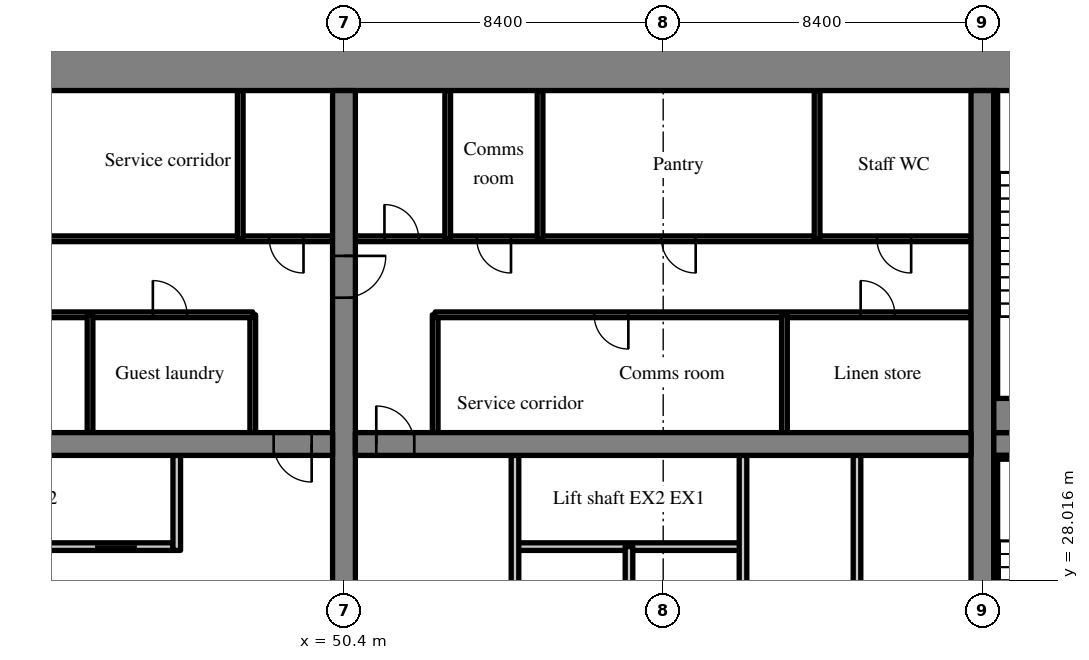
"""IFC4 building model, lengths in metres.
Left out: names, types, materials, properties, quantities, classifications, styles, units other than length and angle.
Written with IfcOpenShell. Run it as: python <this file> out.ifc"""

import sys

from ifc_helpers import new_model, si_unit, direction, frame, frame_2d, origin, place, context, subcontext, project, spatial, rectangle, extrude, source, transform, mapped, element, fill, save


model = new_model("IFC4")
c1 = context("Model", 3, precision=1e-05, world=origin(), true_north=direction((0.0, 1.0)))
c2 = subcontext(c1, "Body", "Model", "MODEL_VIEW")
j1 = project(units=[si_unit("LENGTHUNIT", "METRE"), si_unit("PLANEANGLEUNIT", "RADIAN")], contexts=[c1])
p1 = place(None, origin())
s1 = spatial("IfcSite", under=j1, at=p1, CompositionType="ELEMENT")
p2 = place(p1, origin())
s2 = spatial("IfcBuilding", under=s1, at=p2, CompositionType="ELEMENT")
p3 = place(p2, frame((0.0, 0.0, 39.2)))
s3 = spatial("IfcBuildingStorey", under=s2, at=p3, CompositionType="ELEMENT", Elevation=39.2)
m1 = source(origin(), c2, "Body", "SweptSolid", [
    extrude(rectangle(XDim=50.4, YDim=1.1, at=frame_2d((25.2, 0.0))), origin(), (0.0, 0.0, 1.0), 3.52),
])
p4 = place(p3, frame((25.2, 41.45, 0.0), z_axis=(0.0, 0.0, 1.0), x_axis=(1.0, 0.0, 0.0)))
e1 = element("IfcWall", 1, at=p4, inside=s3, PredefinedType="SHEAR", context=c2, shape_type="MappedRepresentation", body=[
    mapped(m1, transform((0.0, 0.0, 0.0), scale=1.0)),
])
m2 = source(origin(), c2, "Body", "SweptSolid", [
    extrude(rectangle(XDim=17.8, YDim=0.6, at=frame_2d((8.9, 0.0))), origin(), (0.0, 0.0, 1.0), 3.52),
])
p5 = place(p3, frame((50.4, 23.1, 0.0), z_axis=(0.0, 0.0, 1.0), x_axis=(0.0, 1.0, 0.0)))
e2 = element("IfcWall", 2, at=p5, inside=s3, PredefinedType="SHEAR", context=c2, shape_type="MappedRepresentation", body=[
    mapped(m2, transform((0.0, 0.0, 0.0), scale=1.0)),
])
m3 = source(origin(), c2, "Body", "SweptSolid", [
    extrude(rectangle(XDim=1.1, YDim=2.1, at=frame_2d((0.55, 1.05))), frame((0.0, 0.31, 0.0), z_axis=(0.0, -1.0, 0.0), x_axis=(1.0, 0.0, 0.0)), (0.0, 0.0, 1.0), 0.62),
])
p6 = place(p5, frame((12.35, 0.0, 0.0)))
e3 = element("IfcOpeningElement", 3, at=p6, cuts=e2, PredefinedType="OPENING", context=c2, shape_type="MappedRepresentation", body=[
    mapped(m3, transform((0.0, 0.0, 0.0), scale=1.0)),
])
p7 = place(p3, frame((67.2, 23.1, 0.0), z_axis=(0.0, 0.0, 1.0), x_axis=(0.0, 1.0, 0.0)))
e4 = element("IfcWall", 4, at=p7, inside=s3, PredefinedType="SHEAR", context=c2, shape_type="MappedRepresentation", body=[
    mapped(m2, transform((0.0, 0.0, 0.0), scale=1.0)),
])
m4 = source(origin(), c2, "Body", "SweptSolid", [
    extrude(rectangle(XDim=16.2, YDim=0.6, at=frame_2d((8.1, 0.0))), origin(), (0.0, 0.0, 1.0), 3.52),
])
p8 = place(p3, frame((33.9, 31.6, 0.0), z_axis=(0.0, 0.0, 1.0), x_axis=(1.0, 0.0, 0.0)))
e5 = element("IfcWall", 5, at=p8, inside=s3, PredefinedType="SHEAR", context=c2, shape_type="MappedRepresentation", body=[
    mapped(m4, transform((0.0, 0.0, 0.0), scale=1.0)),
])
m5 = source(origin(), c2, "Body", "SweptSolid", [
    extrude(rectangle(XDim=1.0, YDim=2.1, at=frame_2d((0.5, 1.05))), frame((0.0, 0.31, 0.0), z_axis=(0.0, -1.0, 0.0), x_axis=(1.0, 0.0, 0.0)), (0.0, 0.0, 1.0), 0.62),
])
p9 = place(p8, frame((14.65, 0.0, 0.0)))
e6 = element("IfcOpeningElement", 6, at=p9, cuts=e5, PredefinedType="OPENING", context=c2, shape_type="MappedRepresentation", body=[
    mapped(m5, transform((0.0, 0.0, 0.0), scale=1.0)),
])
m6 = source(origin(), c2, "Body", "SweptSolid", [
    extrude(rectangle(XDim=16.2, YDim=0.6, at=frame_2d((8.1, 0.0))), origin(), (0.0, 0.0, 1.0), 3.52),
])
p10 = place(p3, frame((50.7, 31.6, 0.0), z_axis=(0.0, 0.0, 1.0), x_axis=(1.0, 0.0, 0.0)))
e7 = element("IfcWall", 7, at=p10, inside=s3, PredefinedType="SHEAR", context=c2, shape_type="MappedRepresentation", body=[
    mapped(m6, transform((0.0, 0.0, 0.0), scale=1.0)),
])
p11 = place(p10, frame((0.55, 0.0, 0.0)))
e8 = element("IfcOpeningElement", 8, at=p11, cuts=e7, PredefinedType="OPENING", context=c2, shape_type="MappedRepresentation", body=[
    mapped(m5, transform((0.0, 0.0, 0.0), scale=1.0)),
])
m7 = source(origin(), c2, "Body", "SweptSolid", [
    extrude(rectangle(XDim=7.0, YDim=0.6, at=frame_2d((3.5, 0.0))), origin(), (0.0, 0.0, 1.0), 3.52),
])
p12 = place(p3, frame((67.5, 31.6, 0.0), z_axis=(0.0, 0.0, 1.0), x_axis=(1.0, 0.0, 0.0)))
e9 = element("IfcWall", 9, at=p12, inside=s3, PredefinedType="SHEAR", context=c2, shape_type="MappedRepresentation", body=[
    mapped(m7, transform((0.0, 0.0, 0.0), scale=1.0)),
])
p13 = place(p12, frame((5.425, 0.0, 0.0)))
e10 = element("IfcOpeningElement", 10, at=p13, cuts=e9, PredefinedType="OPENING", context=c2, shape_type="MappedRepresentation", body=[
    mapped(m3, transform((0.0, 0.0, 0.0), scale=1.0)),
])
m8 = source(origin(), c2, "Body", "SweptSolid", [
    extrude(rectangle(XDim=12.0, YDim=0.2, at=frame_2d((6.0, 0.0))), origin(), (0.0, 0.0, 1.0), 3.52),
])
p14 = place(p3, frame((33.9, 28.9, 0.0), z_axis=(0.0, 0.0, 1.0), x_axis=(1.0, 0.0, 0.0)))
e11 = element("IfcWall", 11, at=p14, inside=s3, PredefinedType="SOLIDWALL", context=c2, shape_type="MappedRepresentation", body=[
    mapped(m8, transform((0.0, 0.0, 0.0), scale=1.0)),
])
m9 = source(origin(), c2, "Body", "SweptSolid", [
    extrude(rectangle(XDim=1.1, YDim=2.1, at=frame_2d((0.55, 1.05))), frame((0.0, 0.11, 0.0), z_axis=(0.0, -1.0, 0.0), x_axis=(1.0, 0.0, 0.0)), (0.0, 0.0, 1.0), 0.22),
])
p15 = place(p14, frame((0.95, 0.0, 0.0)))
e12 = element("IfcOpeningElement", 12, at=p15, cuts=e11, PredefinedType="OPENING", context=c2, shape_type="MappedRepresentation", body=[
    mapped(m9, transform((0.0, 0.0, 0.0), scale=1.0)),
])
p16 = place(p14, frame((3.95, 0.0, 0.0)))
e13 = element("IfcOpeningElement", 13, at=p16, cuts=e11, PredefinedType="OPENING", context=c2, shape_type="MappedRepresentation", body=[
    mapped(m9, transform((0.0, 0.0, 0.0), scale=1.0)),
])
p17 = place(p14, frame((6.95, 0.0, 0.0)))
e14 = element("IfcOpeningElement", 14, at=p17, cuts=e11, PredefinedType="OPENING", context=c2, shape_type="MappedRepresentation", body=[
    mapped(m9, transform((0.0, 0.0, 0.0), scale=1.0)),
])
p18 = place(p14, frame((9.95, 0.0, 0.0)))
e15 = element("IfcOpeningElement", 15, at=p18, cuts=e11, PredefinedType="OPENING", context=c2, shape_type="MappedRepresentation", body=[
    mapped(m9, transform((0.0, 0.0, 0.0), scale=1.0)),
])
m10 = source(origin(), c2, "Body", "SweptSolid", [
    extrude(rectangle(XDim=2.5, YDim=0.2, at=frame_2d((1.25, 0.0))), origin(), (0.0, 0.0, 1.0), 3.52),
])
p19 = place(p3, frame((46.0, 28.8, 0.0), z_axis=(0.0, 0.0, 1.0), x_axis=(0.0, 1.0, 0.0)))
e16 = element("IfcWall", 16, at=p19, inside=s3, PredefinedType="SOLIDWALL", context=c2, shape_type="MappedRepresentation", body=[
    mapped(m10, transform((0.0, 0.0, 0.0), scale=1.0)),
])
m11 = source(origin(), c2, "Body", "SweptSolid", [
    extrude(rectangle(XDim=3.1, YDim=0.15, at=frame_2d((1.55, 0.0))), origin(), (0.0, 0.0, 1.0), 3.52),
])
p20 = place(p3, frame((48.0, 31.9, 0.0), z_axis=(0.0, 0.0, 1.0), x_axis=(0.0, 1.0, 0.0)))
e17 = element("IfcWall", 17, at=p20, inside=s3, PredefinedType="PARTITIONING", context=c2, shape_type="MappedRepresentation", body=[
    mapped(m11, transform((0.0, 0.0, 0.0), scale=1.0)),
])
m12 = source(origin(), c2, "Body", "SweptSolid", [
    extrude(rectangle(XDim=14.1, YDim=0.15, at=frame_2d((7.05, 0.0))), origin(), (0.0, 0.0, 1.0), 3.52),
])
p21 = place(p3, frame((33.9, 35.0, 0.0), z_axis=(0.0, 0.0, 1.0), x_axis=(1.0, 0.0, 0.0)))
e18 = element("IfcWall", 18, at=p21, inside=s3, PredefinedType="PARTITIONING", context=c2, shape_type="MappedRepresentation", body=[
    mapped(m12, transform((0.0, 0.0, 0.0), scale=1.0)),
])
m13 = source(origin(), c2, "Body", "SweptSolid", [
    extrude(rectangle(XDim=0.9, YDim=2.1, at=frame_2d((0.45, 1.05))), frame((0.0, 0.085, 0.0), z_axis=(0.0, -1.0, 0.0), x_axis=(1.0, 0.0, 0.0)), (0.0, 0.0, 1.0), 0.17),
])
p22 = place(p21, frame((0.952, 0.0, 0.0)))
e19 = element("IfcOpeningElement", 19, at=p22, cuts=e18, PredefinedType="OPENING", context=c2, shape_type="MappedRepresentation", body=[
    mapped(m13, transform((0.0, 0.0, 0.0), scale=1.0)),
])
p23 = place(p21, frame((5.861, 0.0, 0.0)))
e20 = element("IfcOpeningElement", 20, at=p23, cuts=e18, PredefinedType="OPENING", context=c2, shape_type="MappedRepresentation", body=[
    mapped(m13, transform((0.0, 0.0, 0.0), scale=1.0)),
])
p24 = place(p21, frame((11.471, 0.0, 0.0)))
e21 = element("IfcOpeningElement", 21, at=p24, cuts=e18, PredefinedType="OPENING", context=c2, shape_type="MappedRepresentation", body=[
    mapped(m13, transform((0.0, 0.0, 0.0), scale=1.0)),
])
m14 = source(origin(), c2, "Body", "SweptSolid", [
    extrude(rectangle(XDim=16.2, YDim=0.15, at=frame_2d((8.1, 0.0))), origin(), (0.0, 0.0, 1.0), 3.52),
])
p25 = place(p3, frame((33.9, 37.0, 0.0), z_axis=(0.0, 0.0, 1.0), x_axis=(1.0, 0.0, 0.0)))
e22 = element("IfcWall", 22, at=p25, inside=s3, PredefinedType="PARTITIONING", context=c2, shape_type="MappedRepresentation", body=[
    mapped(m14, transform((0.0, 0.0, 0.0), scale=1.0)),
])
p26 = place(p25, frame((6.435, 0.0, 0.0)))
e23 = element("IfcOpeningElement", 23, at=p26, cuts=e22, PredefinedType="OPENING", context=c2, shape_type="MappedRepresentation", body=[
    mapped(m13, transform((0.0, 0.0, 0.0), scale=1.0)),
])
p27 = place(p25, frame((14.535, 0.0, 0.0)))
e24 = element("IfcOpeningElement", 24, at=p27, cuts=e22, PredefinedType="OPENING", context=c2, shape_type="MappedRepresentation", body=[
    mapped(m13, transform((0.0, 0.0, 0.0), scale=1.0)),
])
p28 = place(p3, frame((43.718, 31.9, 0.0), z_axis=(0.0, 0.0, 1.0), x_axis=(0.0, 1.0, 0.0)))
e25 = element("IfcWall", 25, at=p28, inside=s3, PredefinedType="PARTITIONING", context=c2, shape_type="MappedRepresentation", body=[
    mapped(m11, transform((0.0, 0.0, 0.0), scale=1.0)),
])
m15 = source(origin(), c2, "Body", "SweptSolid", [
    extrude(rectangle(XDim=3.9, YDim=0.15, at=frame_2d((1.95, 0.0))), origin(), (0.0, 0.0, 1.0), 3.52),
])
p29 = place(p3, frame((47.67, 37.0, 0.0), z_axis=(0.0, 0.0, 1.0), x_axis=(0.0, 1.0, 0.0)))
e26 = element("IfcWall", 26, at=p29, inside=s3, PredefinedType="PARTITIONING", context=c2, shape_type="MappedRepresentation", body=[
    mapped(m15, transform((0.0, 0.0, 0.0), scale=1.0)),
])
m16 = source(origin(), c2, "Body", "SweptSolid", [
    extrude(rectangle(XDim=6.0, YDim=0.2, at=frame_2d((3.0, 0.0))), origin(), (0.0, 0.0, 1.0), 3.52),
])
p30 = place(p3, frame((60.9, 28.9, 0.0), z_axis=(0.0, 0.0, 1.0), x_axis=(-1.0, 0.0, 0.0)))
e27 = element("IfcWall", 27, at=p30, inside=s3, PredefinedType="SOLIDWALL", context=c2, shape_type="MappedRepresentation", body=[
    mapped(m16, transform((0.0, 0.0, 0.0), scale=1.0)),
])
m17 = source(origin(), c2, "Body", "SweptSolid", [
    extrude(rectangle(XDim=8.2, YDim=0.2, at=frame_2d((4.1, 0.0))), origin(), (0.0, 0.0, 1.0), 3.52),
])
for number, where, z_axis, x_axis in (
    (28, (54.9, 23.1, 0.0), (0.0, 0.0, 1.0), (0.0, 1.0, 0.0)),
    (29, (60.9, 23.1, 0.0), (0.0, 0.0, 1.0), (0.0, 1.0, 0.0)),
):
    element("IfcWall", number, at=place(p3, frame(where, z_axis=z_axis, x_axis=x_axis)), inside=s3, PredefinedType="PARTITIONING", context=c2, shape_type="MappedRepresentation", body=[
        mapped(m17, transform((0.0, 0.0, 0.0), scale=1.0)),
    ])
m18 = source(origin(), c2, "Body", "SweptSolid", [
    extrude(rectangle(XDim=5.8, YDim=0.2, at=frame_2d((2.9, 0.0))), origin(), (0.0, 0.0, 1.0), 3.52),
])
p31 = place(p3, frame((57.9, 23.1, 0.0), z_axis=(0.0, 0.0, 1.0), x_axis=(0.0, 1.0, 0.0)))
e30 = element("IfcWall", 30, at=p31, inside=s3, PredefinedType="PARTITIONING", context=c2, shape_type="MappedRepresentation", body=[
    mapped(m18, transform((0.0, 0.0, 0.0), scale=1.0)),
])
p32 = place(p3, frame((63.9, 23.1, 0.0), z_axis=(0.0, 0.0, 1.0), x_axis=(0.0, 1.0, 0.0)))
e31 = element("IfcWall", 31, at=p32, inside=s3, PredefinedType="PARTITIONING", context=c2, shape_type="MappedRepresentation", body=[
    mapped(m17, transform((0.0, 0.0, 0.0), scale=1.0)),
])
p33 = place(p3, frame((52.8, 31.9, 0.0), z_axis=(0.0, 0.0, 1.0), x_axis=(0.0, 1.0, 0.0)))
e32 = element("IfcWall", 32, at=p33, inside=s3, PredefinedType="PARTITIONING", context=c2, shape_type="MappedRepresentation", body=[
    mapped(m11, transform((0.0, 0.0, 0.0), scale=1.0)),
])
m19 = source(origin(), c2, "Body", "SweptSolid", [
    extrude(rectangle(XDim=14.1, YDim=0.15, at=frame_2d((7.05, 0.0))), origin(), (0.0, 0.0, 1.0), 3.52),
])
p34 = place(p3, frame((66.9, 35.0, 0.0), z_axis=(0.0, 0.0, 1.0), x_axis=(-1.0, 0.0, 0.0)))
e33 = element("IfcWall", 33, at=p34, inside=s3, PredefinedType="PARTITIONING", context=c2, shape_type="MappedRepresentation", body=[
    mapped(m19, transform((0.0, 0.0, 0.0), scale=1.0)),
])
p35 = place(p34, frame((2.004, 0.0, 0.0)))
e34 = element("IfcOpeningElement", 34, at=p35, cuts=e33, PredefinedType="OPENING", context=c2, shape_type="MappedRepresentation", body=[
    mapped(m13, transform((0.0, 0.0, 0.0), scale=1.0)),
])
p36 = place(p34, frame((9.017, 0.0, 0.0)))
e35 = element("IfcOpeningElement", 35, at=p36, cuts=e33, PredefinedType="OPENING", context=c2, shape_type="MappedRepresentation", body=[
    mapped(m13, transform((0.0, 0.0, 0.0), scale=1.0)),
])
m20 = source(origin(), c2, "Body", "SweptSolid", [
    extrude(rectangle(XDim=16.2, YDim=0.15, at=frame_2d((8.1, 0.0))), origin(), (0.0, 0.0, 1.0), 3.52),
])
p37 = place(p3, frame((66.9, 37.0, 0.0), z_axis=(0.0, 0.0, 1.0), x_axis=(-1.0, 0.0, 0.0)))
e36 = element("IfcWall", 36, at=p37, inside=s3, PredefinedType="PARTITIONING", context=c2, shape_type="MappedRepresentation", body=[
    mapped(m20, transform((0.0, 0.0, 0.0), scale=1.0)),
])
p38 = place(p37, frame((1.575, 0.0, 0.0)))
e37 = element("IfcOpeningElement", 37, at=p38, cuts=e36, PredefinedType="OPENING", context=c2, shape_type="MappedRepresentation", body=[
    mapped(m13, transform((0.0, 0.0, 0.0), scale=1.0)),
])
p39 = place(p37, frame((7.245, 0.0, 0.0)))
e38 = element("IfcOpeningElement", 38, at=p39, cuts=e36, PredefinedType="OPENING", context=c2, shape_type="MappedRepresentation", body=[
    mapped(m13, transform((0.0, 0.0, 0.0), scale=1.0)),
])
p40 = place(p37, frame((12.105, 0.0, 0.0)))
e39 = element("IfcOpeningElement", 39, at=p40, cuts=e36, PredefinedType="OPENING", context=c2, shape_type="MappedRepresentation", body=[
    mapped(m13, transform((0.0, 0.0, 0.0), scale=1.0)),
])
p41 = place(p37, frame((14.535, 0.0, 0.0)))
e40 = element("IfcOpeningElement", 40, at=p41, cuts=e36, PredefinedType="OPENING", context=c2, shape_type="MappedRepresentation", body=[
    mapped(m13, transform((0.0, 0.0, 0.0), scale=1.0)),
])
p42 = place(p3, frame((61.991, 31.9, 0.0), z_axis=(0.0, 0.0, 1.0), x_axis=(0.0, 1.0, 0.0)))
e41 = element("IfcWall", 41, at=p42, inside=s3, PredefinedType="PARTITIONING", context=c2, shape_type="MappedRepresentation", body=[
    mapped(m11, transform((0.0, 0.0, 0.0), scale=1.0)),
])
for number, where, z_axis, x_axis in (
    (42, (62.85, 37.0, 0.0), (0.0, 0.0, 1.0), (0.0, 1.0, 0.0)),
    (43, (55.56, 37.0, 0.0), (0.0, 0.0, 1.0), (0.0, 1.0, 0.0)),
    (44, (53.13, 37.0, 0.0), (0.0, 0.0, 1.0), (0.0, 1.0, 0.0)),
):
    element("IfcWall", number, at=place(p3, frame(where, z_axis=z_axis, x_axis=x_axis)), inside=s3, PredefinedType="PARTITIONING", context=c2, shape_type="MappedRepresentation", body=[
        mapped(m15, transform((0.0, 0.0, 0.0), scale=1.0)),
    ])
m21 = source(origin(), c2, "Body", "SweptSolid", [
    extrude(rectangle(XDim=4.75, YDim=0.1, at=frame_2d((2.375, 0.0))), origin(), (0.0, 0.0, 1.0), 3.52),
])
p43 = place(p3, frame((67.5, 31.25, 0.0), z_axis=(0.0, 0.0, 1.0), x_axis=(1.0, 0.0, 0.0)))
e45 = element("IfcWall", 45, at=p43, inside=s3, PredefinedType="SOLIDWALL", context=c2, shape_type="MappedRepresentation", body=[
    mapped(m21, transform((0.0, 0.0, 0.0), scale=1.0)),
])
m22 = source(origin(), c2, "Body", "SweptSolid", [
    extrude(rectangle(XDim=8.1, YDim=0.1, at=frame_2d((4.05, 0.0))), origin(), (0.0, 0.0, 1.0), 3.52),
])
p44 = place(p3, frame((67.55, 23.1, 0.0), z_axis=(0.0, 0.0, 1.0), x_axis=(0.0, 1.0, 0.0)))
e46 = element("IfcWall", 46, at=p44, inside=s3, PredefinedType="SOLIDWALL", context=c2, shape_type="MappedRepresentation", body=[
    mapped(m22, transform((0.0, 0.0, 0.0), scale=1.0)),
])
m23 = source(origin(), c2, "Body", "SweptSolid", [
    extrude(rectangle(XDim=4.75, YDim=0.9, at=frame_2d((2.375, 0.0))), origin(), (0.0, 0.0, 1.0), 3.52),
])
p45 = place(p3, frame((67.5, 32.35, 0.0), z_axis=(0.0, 0.0, 1.0), x_axis=(1.0, 0.0, 0.0)))
e47 = element("IfcWall", 47, at=p45, inside=s3, PredefinedType="SOLIDWALL", context=c2, shape_type="MappedRepresentation", body=[
    mapped(m23, transform((0.0, 0.0, 0.0), scale=1.0)),
])
p46 = place(p3, frame((67.55, 32.8, 0.0), z_axis=(0.0, 0.0, 1.0), x_axis=(0.0, 1.0, 0.0)))
e48 = element("IfcWall", 48, at=p46, inside=s3, PredefinedType="SOLIDWALL", context=c2, shape_type="MappedRepresentation", body=[
    mapped(m22, transform((0.0, 0.0, 0.0), scale=1.0)),
])
m24 = source(origin(), c2, "Body", "SweptSolid", [
    extrude(rectangle(XDim=1.0, YDim=2.1, at=frame_2d((0.5, 1.05))), frame((0.0, 0.025, 0.0), z_axis=(0.0, -1.0, 0.0), x_axis=(1.0, 0.0, 0.0)), (0.0, 0.0, 1.0), 0.05),
])
p47 = place(p9, origin())
e49 = element("IfcDoor", 49, at=p47, inside=s3, OperationType="SINGLE_SWING_RIGHT", PredefinedType="DOOR", context=c2, shape_type="MappedRepresentation", body=[
    mapped(m24, transform((0.0, 0.0, 0.0), scale=1.0)),
])
fill(e6, e49)
m25 = source(origin(), c2, "Body", "SweptSolid", [
    extrude(rectangle(XDim=1.1, YDim=2.1, at=frame_2d((0.55, 1.05))), frame((0.0, 0.025, 0.0), z_axis=(0.0, -1.0, 0.0), x_axis=(1.0, 0.0, 0.0)), (0.0, 0.0, 1.0), 0.05),
])
p48 = place(p18, origin())
e50 = element("IfcDoor", 50, at=p48, inside=s3, OperationType="SLIDING_TO_RIGHT", PredefinedType="DOOR", context=c2, shape_type="MappedRepresentation", body=[
    mapped(m25, transform((0.0, 0.0, 0.0), scale=1.0)),
])
fill(e15, e50)
m26 = source(origin(), c2, "Body", "SweptSolid", [
    extrude(rectangle(XDim=0.9, YDim=2.1, at=frame_2d((0.45, 1.05))), frame((0.0, 0.025, 0.0), z_axis=(0.0, -1.0, 0.0), x_axis=(1.0, 0.0, 0.0)), (0.0, 0.0, 1.0), 0.05),
])
p49 = place(p24, origin())
e51 = element("IfcDoor", 51, at=p49, inside=s3, OperationType="SINGLE_SWING_LEFT", PredefinedType="DOOR", context=c2, shape_type="MappedRepresentation", body=[
    mapped(m26, transform((0.0, 0.0, 0.0), scale=1.0)),
])
fill(e21, e51)
p50 = place(p27, origin())
e52 = element("IfcDoor", 52, at=p50, inside=s3, OperationType="SINGLE_SWING_RIGHT", PredefinedType="DOOR", context=c2, shape_type="MappedRepresentation", body=[
    mapped(m26, transform((0.0, 0.0, 0.0), scale=1.0)),
])
fill(e24, e52)
p51 = place(p11, origin())
e53 = element("IfcDoor", 53, at=p51, inside=s3, OperationType="SINGLE_SWING_LEFT", PredefinedType="DOOR", context=c2, shape_type="MappedRepresentation", body=[
    mapped(m24, transform((0.0, 0.0, 0.0), scale=1.0)),
])
fill(e8, e53)
p52 = place(p35, origin())
e54 = element("IfcDoor", 54, at=p52, inside=s3, OperationType="SINGLE_SWING_RIGHT", PredefinedType="DOOR", context=c2, shape_type="MappedRepresentation", body=[
    mapped(m26, transform((0.0, 0.0, 0.0), scale=1.0)),
])
fill(e34, e54)
p53 = place(p36, origin())
e55 = element("IfcDoor", 55, at=p53, inside=s3, OperationType="SINGLE_SWING_LEFT", PredefinedType="DOOR", context=c2, shape_type="MappedRepresentation", body=[
    mapped(m26, transform((0.0, 0.0, 0.0), scale=1.0)),
])
fill(e35, e55)
p54 = place(p38, origin())
e56 = element("IfcDoor", 56, at=p54, inside=s3, OperationType="SINGLE_SWING_LEFT", PredefinedType="DOOR", context=c2, shape_type="MappedRepresentation", body=[
    mapped(m26, transform((0.0, 0.0, 0.0), scale=1.0)),
])
fill(e37, e56)
p55 = place(p39, origin())
e57 = element("IfcDoor", 57, at=p55, inside=s3, OperationType="SINGLE_SWING_LEFT", PredefinedType="DOOR", context=c2, shape_type="MappedRepresentation", body=[
    mapped(m26, transform((0.0, 0.0, 0.0), scale=1.0)),
])
fill(e38, e57)
p56 = place(p40, origin())
e58 = element("IfcDoor", 58, at=p56, inside=s3, OperationType="SINGLE_SWING_LEFT", PredefinedType="DOOR", context=c2, shape_type="MappedRepresentation", body=[
    mapped(m26, transform((0.0, 0.0, 0.0), scale=1.0)),
])
fill(e39, e58)
p57 = place(p41, origin())
e59 = element("IfcDoor", 59, at=p57, inside=s3, OperationType="SINGLE_SWING_RIGHT", PredefinedType="DOOR", context=c2, shape_type="MappedRepresentation", body=[
    mapped(m26, transform((0.0, 0.0, 0.0), scale=1.0)),
])
fill(e40, e59)
p58 = place(p6, origin())
e60 = element("IfcDoor", 60, at=p58, inside=s3, OperationType="SINGLE_SWING_RIGHT", PredefinedType="DOOR", context=c2, shape_type="MappedRepresentation", body=[
    mapped(m25, transform((0.0, 0.0, 0.0), scale=1.0)),
])
fill(e3, e60)
save(model, sys.argv[1])
